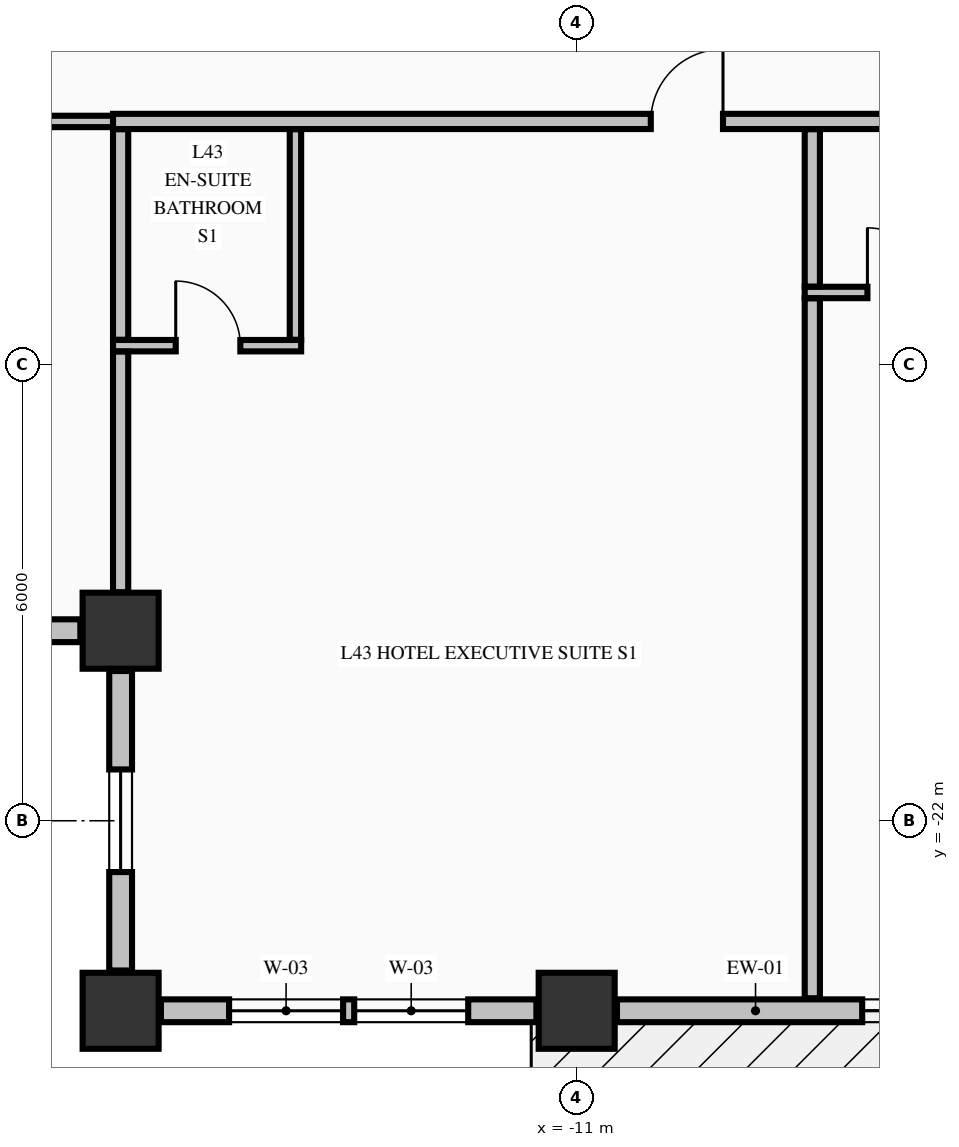
"""IFC4 building model, lengths in metres.
Left out: names, types, materials, properties, quantities, classifications, styles, units other than length and angle.
Written with IfcOpenShell. Run it as: python <this file> out.ifc"""

import sys

from ifc_helpers import new_model, si_unit, direction, frame, frame_2d, origin, origin_2d, place, context, subcontext, project, spatial, rectangle, extrude, element, fill, save


model = new_model("IFC4")
c1 = context("Model", 3, precision=1e-05, world=origin(), true_north=direction((0.0, 1.0)))
c2 = subcontext(c1, "Body", "Model", "MODEL_VIEW")
j1 = project(units=[si_unit("LENGTHUNIT", "METRE"), si_unit("PLANEANGLEUNIT", "RADIAN")], contexts=[c1])
p1 = place(None, origin())
s1 = spatial("IfcSite", under=j1, at=p1, CompositionType="ELEMENT")
p2 = place(p1, origin())
s2 = spatial("IfcBuilding", under=s1, at=p2, CompositionType="ELEMENT")
p3 = place(p2, frame((0.0, 0.0, 169.46)))
s3 = spatial("IfcBuildingStorey", under=s2, at=p3, CompositionType="ELEMENT", Elevation=169.46)
for number, where, z_axis, x_axis in (
    (1, (-17.0, -24.5, -0.25), (0.0, 0.0, 1.0), (1.0, 0.0, 0.0)),
    (2, (-11.0, -24.5, -0.25), (0.0, 0.0, 1.0), (1.0, 0.0, 0.0)),
    (3, (-17.0, -19.5, -0.25), (0.0, 0.0, 1.0), (1.0, 0.0, 0.0)),
):
    element("IfcColumn", number, at=place(p3, frame(where, z_axis=z_axis, x_axis=x_axis)), inside=s3, PredefinedType="COLUMN", context=c2, shape_type="SweptSolid", body=[
        extrude(rectangle(XDim=1.0, YDim=1.0, at=origin_2d()), origin(), (0.0, 0.0, 1.0), 3.4),
    ])
p4 = place(p3, frame((-21.47, -19.5, 0.0), z_axis=(0.0, 0.0, 1.0), x_axis=(1.0, 0.0, 0.0)))
e4 = element("IfcWall", 4, at=p4, inside=s3, PredefinedType="STANDARD", context=c2, shape_type="SweptSolid", body=[
    extrude(rectangle(XDim=3.94, YDim=0.3, at=frame_2d((1.97, 0.0))), origin(), (0.0, 0.0, 1.0), 2.542),
])
p5 = place(p4, frame((1.295, 0.0, 0.68)))
e5 = element("IfcOpeningElement", 5, at=p5, cuts=e4, PredefinedType="OPENING", context=c2, shape_type="SweptSolid", body=[
    extrude(rectangle(XDim=1.35, YDim=1.42, at=frame_2d((0.675, 0.71))), frame((0.0, 0.16, 0.0), z_axis=(0.0, -1.0, 0.0), x_axis=(1.0, 0.0, 0.0)), (0.0, 0.0, 1.0), 0.32),
])
p6 = place(p3, frame((-17.0, -20.03, 0.0), z_axis=(0.0, 0.0, 1.0), x_axis=(0.0, -1.0, 0.0)))
e6 = element("IfcWall", 6, at=p6, inside=s3, PredefinedType="STANDARD", context=c2, shape_type="SweptSolid", body=[
    extrude(rectangle(XDim=3.94, YDim=0.3, at=frame_2d((1.97, 0.0))), origin(), (0.0, 0.0, 1.0), 2.542),
])
p7 = place(p6, frame((1.295, 0.0, 0.68)))
e7 = element("IfcOpeningElement", 7, at=p7, cuts=e6, PredefinedType="OPENING", context=c2, shape_type="SweptSolid", body=[
    extrude(rectangle(XDim=1.35, YDim=1.42, at=frame_2d((0.675, 0.71))), frame((0.0, 0.16, 0.0), z_axis=(0.0, -1.0, 0.0), x_axis=(1.0, 0.0, 0.0)), (0.0, 0.0, 1.0), 0.32),
])
p8 = place(p3, frame((-16.47, -24.5, 0.0), z_axis=(0.0, 0.0, 1.0), x_axis=(1.0, 0.0, 0.0)))
e8 = element("IfcWall", 8, at=p8, inside=s3, PredefinedType="STANDARD", context=c2, shape_type="SweptSolid", body=[
    extrude(rectangle(XDim=4.94, YDim=0.3, at=frame_2d((2.47, 0.0))), origin(), (0.0, 0.0, 1.0), 2.542),
])
p9 = place(p8, frame((0.897, 0.0, 0.72)))
e9 = element("IfcOpeningElement", 9, at=p9, cuts=e8, PredefinedType="OPENING", context=c2, shape_type="SweptSolid", body=[
    extrude(rectangle(XDim=1.5, YDim=1.6, at=frame_2d((0.75, 0.8))), frame((0.0, 0.16, 0.0), z_axis=(0.0, -1.0, 0.0), x_axis=(1.0, 0.0, 0.0)), (0.0, 0.0, 1.0), 0.32),
])
p10 = place(p8, frame((2.543, 0.0, 0.72)))
e10 = element("IfcOpeningElement", 10, at=p10, cuts=e8, PredefinedType="OPENING", context=c2, shape_type="SweptSolid", body=[
    extrude(rectangle(XDim=1.5, YDim=1.6, at=frame_2d((0.75, 0.8))), frame((0.0, 0.16, 0.0), z_axis=(0.0, -1.0, 0.0), x_axis=(1.0, 0.0, 0.0)), (0.0, 0.0, 1.0), 0.32),
])
p11 = place(p3, frame((-10.47, -24.5, 0.0), z_axis=(0.0, 0.0, 1.0), x_axis=(1.0, 0.0, 0.0)))
e11 = element("IfcWall", 11, at=p11, inside=s3, PredefinedType="STANDARD", context=c2, shape_type="SweptSolid", body=[
    extrude(rectangle(XDim=9.94, YDim=0.3, at=frame_2d((4.97, 0.0))), origin(), (0.0, 0.0, 1.0), 2.542),
])
p12 = place(p11, frame((7.585, 0.0, 0.0)))
e12 = element("IfcOpeningElement", 12, at=p12, cuts=e11, PredefinedType="OPENING", context=c2, shape_type="SweptSolid", body=[
    extrude(rectangle(XDim=1.1, YDim=2.15, at=frame_2d((0.55, 1.075))), frame((0.0, 0.16, 0.0), z_axis=(0.0, -1.0, 0.0), x_axis=(1.0, 0.0, 0.0)), (0.0, 0.0, 1.0), 0.32),
])
p13 = place(p11, frame((3.226, 0.0, 0.72)))
e13 = element("IfcOpeningElement", 13, at=p13, cuts=e11, PredefinedType="OPENING", context=c2, shape_type="SweptSolid", body=[
    extrude(rectangle(XDim=1.5, YDim=1.6, at=frame_2d((0.75, 0.8))), frame((0.0, 0.16, 0.0), z_axis=(0.0, -1.0, 0.0), x_axis=(1.0, 0.0, 0.0)), (0.0, 0.0, 1.0), 0.32),
])
p14 = place(p11, frame((5.214, 0.0, 0.72)))
e14 = element("IfcOpeningElement", 14, at=p14, cuts=e11, PredefinedType="OPENING", context=c2, shape_type="SweptSolid", body=[
    extrude(rectangle(XDim=1.5, YDim=1.6, at=frame_2d((0.75, 0.8))), frame((0.0, 0.16, 0.0), z_axis=(0.0, -1.0, 0.0), x_axis=(1.0, 0.0, 0.0)), (0.0, 0.0, 1.0), 0.32),
])
p15 = place(p3, frame((-17.1, -15.75, 0.0), z_axis=(0.0, 0.0, 1.0), x_axis=(1.0, 0.0, 0.0)))
e15 = element("IfcWall", 15, at=p15, inside=s3, PredefinedType="PARTITIONING", context=c2, shape_type="SweptSolid", body=[
    extrude(rectangle(XDim=2.475, YDim=0.15, at=frame_2d((1.238, 0.0))), origin(), (0.0, 0.0, 1.0), 3.15),
])
p16 = place(p15, frame((0.825, 0.0, 0.0)))
e16 = element("IfcOpeningElement", 16, at=p16, cuts=e15, PredefinedType="OPENING", context=c2, shape_type="SweptSolid", body=[
    extrude(rectangle(XDim=0.85, YDim=2.1, at=frame_2d((0.425, 1.05))), frame((0.0, 0.085, 0.0), z_axis=(0.0, -1.0, 0.0), x_axis=(1.0, 0.0, 0.0)), (0.0, 0.0, 1.0), 0.17),
])
p17 = place(p3, frame((-8.0, -15.05, 0.0), z_axis=(0.0, 0.0, 1.0), x_axis=(1.0, 0.0, 0.0)))
e17 = element("IfcWall", 17, at=p17, inside=s3, PredefinedType="PARTITIONING", context=c2, shape_type="SweptSolid", body=[
    extrude(rectangle(XDim=2.475, YDim=0.15, at=frame_2d((1.238, 0.0))), origin(), (0.0, 0.0, 1.0), 3.15),
])
p18 = place(p17, frame((0.825, 0.0, 0.0)))
e18 = element("IfcOpeningElement", 18, at=p18, cuts=e17, PredefinedType="OPENING", context=c2, shape_type="SweptSolid", body=[
    extrude(rectangle(XDim=0.85, YDim=2.1, at=frame_2d((0.425, 1.05))), frame((0.0, 0.085, 0.0), z_axis=(0.0, -1.0, 0.0), x_axis=(1.0, 0.0, 0.0)), (0.0, 0.0, 1.0), 0.17),
])
p19 = place(p3, frame((-20.075, -12.8, 0.0), z_axis=(0.0, 0.0, 1.0), x_axis=(1.0, 0.0, 0.0)))
e19 = element("IfcWall", 19, at=p19, inside=s3, PredefinedType="PARTITIONING", context=c2, shape_type="SweptSolid", body=[
    extrude(rectangle(XDim=3.175, YDim=0.15, at=frame_2d((1.587, 0.0))), origin(), (0.0, 0.0, 1.0), 3.15),
])
p20 = place(p3, frame((-17.1, -12.8, 0.0), z_axis=(0.0, 0.0, 1.0), x_axis=(1.0, 0.0, 0.0)))
e20 = element("IfcWall", 20, at=p20, inside=s3, PredefinedType="PARTITIONING", context=c2, shape_type="SweptSolid", body=[
    extrude(rectangle(XDim=39.2, YDim=0.2, at=frame_2d((19.6, 0.0))), origin(), (0.0, 0.0, 1.0), 3.15),
])
p21 = place(p20, frame((7.075, 0.0, 0.0)))
e21 = element("IfcOpeningElement", 21, at=p21, cuts=e20, PredefinedType="OPENING", context=c2, shape_type="SweptSolid", body=[
    extrude(rectangle(XDim=0.95, YDim=2.15, at=frame_2d((0.475, 1.075))), frame((0.0, 0.11, 0.0), z_axis=(0.0, -1.0, 0.0), x_axis=(1.0, 0.0, 0.0)), (0.0, 0.0, 1.0), 0.22),
])
p22 = place(p20, frame((18.075, 0.0, 0.0)))
e22 = element("IfcOpeningElement", 22, at=p22, cuts=e20, PredefinedType="OPENING", context=c2, shape_type="SweptSolid", body=[
    extrude(rectangle(XDim=0.95, YDim=2.15, at=frame_2d((0.475, 1.075))), frame((0.0, 0.11, 0.0), z_axis=(0.0, -1.0, 0.0), x_axis=(1.0, 0.0, 0.0)), (0.0, 0.0, 1.0), 0.22),
])
p23 = place(p20, frame((25.605, 0.0, 0.0)))
e23 = element("IfcOpeningElement", 23, at=p23, cuts=e20, PredefinedType="OPENING", context=c2, shape_type="SweptSolid", body=[
    extrude(rectangle(XDim=0.95, YDim=2.15, at=frame_2d((0.475, 1.075))), frame((0.0, 0.11, 0.0), z_axis=(0.0, -1.0, 0.0), x_axis=(1.0, 0.0, 0.0)), (0.0, 0.0, 1.0), 0.22),
])
p24 = place(p20, frame((32.755, 0.0, 0.0)))
e24 = element("IfcOpeningElement", 24, at=p24, cuts=e20, PredefinedType="OPENING", context=c2, shape_type="SweptSolid", body=[
    extrude(rectangle(XDim=1.05, YDim=2.15, at=frame_2d((0.525, 1.075))), frame((0.0, 0.11, 0.0), z_axis=(0.0, -1.0, 0.0), x_axis=(1.0, 0.0, 0.0)), (0.0, 0.0, 1.0), 0.22),
])
p25 = place(p3, frame((-17.0, -18.994, 0.0), z_axis=(0.0, 0.0, 1.0), x_axis=(0.0, 1.0, 0.0)))
e25 = element("IfcWall", 25, at=p25, inside=s3, PredefinedType="PARTITIONING", context=c2, shape_type="SweptSolid", body=[
    extrude(rectangle(XDim=3.166, YDim=0.2, at=frame_2d((1.583, 0.0))), origin(), (0.0, 0.0, 1.0), 3.15),
])
p26 = place(p3, frame((-17.0, -15.672, 0.0), z_axis=(0.0, 0.0, 1.0), x_axis=(0.0, 1.0, 0.0)))
e26 = element("IfcWall", 26, at=p26, inside=s3, PredefinedType="PARTITIONING", context=c2, shape_type="SweptSolid", body=[
    extrude(rectangle(XDim=2.769, YDim=0.2, at=frame_2d((1.385, 0.0))), origin(), (0.0, 0.0, 1.0), 3.15),
])
p27 = place(p3, frame((-14.7, -15.672, 0.0), z_axis=(0.0, 0.0, 1.0), x_axis=(0.0, 1.0, 0.0)))
e27 = element("IfcWall", 27, at=p27, inside=s3, PredefinedType="PARTITIONING", context=c2, shape_type="SweptSolid", body=[
    extrude(rectangle(XDim=2.769, YDim=0.15, at=frame_2d((1.385, 0.0))), origin(), (0.0, 0.0, 1.0), 3.15),
])
p28 = place(p3, frame((-7.9, -24.335, 0.0), z_axis=(0.0, 0.0, 1.0), x_axis=(0.0, 1.0, 0.0)))
e28 = element("IfcWall", 28, at=p28, inside=s3, PredefinedType="PARTITIONING", context=c2, shape_type="SweptSolid", body=[
    extrude(rectangle(XDim=9.207, YDim=0.2, at=frame_2d((4.604, 0.0))), origin(), (0.0, 0.0, 1.0), 3.15),
])
p29 = place(p3, frame((-7.9, -14.972, 0.0), z_axis=(0.0, 0.0, 1.0), x_axis=(0.0, 1.0, 0.0)))
e29 = element("IfcWall", 29, at=p29, inside=s3, PredefinedType="PARTITIONING", context=c2, shape_type="SweptSolid", body=[
    extrude(rectangle(XDim=2.069, YDim=0.2, at=frame_2d((1.034, 0.0))), origin(), (0.0, 0.0, 1.0), 3.15),
])
p30 = place(p7, origin())
e30 = element("IfcWindow", 30, at=p30, inside=s3, PartitioningType="SINGLE_PANEL", PredefinedType="WINDOW", context=c2, shape_type="SweptSolid", body=[
    extrude(rectangle(XDim=1.35, YDim=1.42, at=frame_2d((0.675, 0.71))), frame((0.0, 0.03, 0.0), z_axis=(0.0, -1.0, 0.0), x_axis=(1.0, 0.0, 0.0)), (0.0, 0.0, 1.0), 0.06),
])
fill(e7, e30)
p31 = place(p9, origin())
e31 = element("IfcWindow", 31, at=p31, inside=s3, PartitioningType="SINGLE_PANEL", PredefinedType="WINDOW", context=c2, shape_type="SweptSolid", body=[
    extrude(rectangle(XDim=1.5, YDim=1.6, at=frame_2d((0.75, 0.8))), frame((0.0, 0.03, 0.0), z_axis=(0.0, -1.0, 0.0), x_axis=(1.0, 0.0, 0.0)), (0.0, 0.0, 1.0), 0.06),
])
fill(e9, e31)
p32 = place(p10, origin())
e32 = element("IfcWindow", 32, at=p32, inside=s3, PartitioningType="SINGLE_PANEL", PredefinedType="WINDOW", context=c2, shape_type="SweptSolid", body=[
    extrude(rectangle(XDim=1.5, YDim=1.6, at=frame_2d((0.75, 0.8))), frame((0.0, 0.03, 0.0), z_axis=(0.0, -1.0, 0.0), x_axis=(1.0, 0.0, 0.0)), (0.0, 0.0, 1.0), 0.06),
])
fill(e10, e32)
p33 = place(p13, origin())
e33 = element("IfcWindow", 33, at=p33, inside=s3, PartitioningType="SINGLE_PANEL", PredefinedType="WINDOW", context=c2, shape_type="SweptSolid", body=[
    extrude(rectangle(XDim=1.5, YDim=1.6, at=frame_2d((0.75, 0.8))), frame((0.0, 0.03, 0.0), z_axis=(0.0, -1.0, 0.0), x_axis=(1.0, 0.0, 0.0)), (0.0, 0.0, 1.0), 0.06),
])
fill(e13, e33)
p34 = place(p21, origin())
e34 = element("IfcDoor", 34, at=p34, inside=s3, OperationType="SINGLE_SWING_RIGHT", PredefinedType="DOOR", context=c2, shape_type="SweptSolid", body=[
    extrude(rectangle(XDim=0.95, YDim=2.15, at=frame_2d((0.475, 1.075))), frame((0.0, 0.025, 0.0), z_axis=(0.0, -1.0, 0.0), x_axis=(1.0, 0.0, 0.0)), (0.0, 0.0, 1.0), 0.05),
])
fill(e21, e34)
p35 = place(p16, origin())
e35 = element("IfcDoor", 35, at=p35, inside=s3, OperationType="SINGLE_SWING_LEFT", PredefinedType="DOOR", context=c2, shape_type="SweptSolid", body=[
    extrude(rectangle(XDim=0.85, YDim=2.1, at=frame_2d((0.425, 1.05))), frame((0.0, 0.025, 0.0), z_axis=(0.0, -1.0, 0.0), x_axis=(1.0, 0.0, 0.0)), (0.0, 0.0, 1.0), 0.05),
])
fill(e16, e35)
p36 = place(p18, origin())
e36 = element("IfcDoor", 36, at=p36, inside=s3, OperationType="SINGLE_SWING_LEFT", PredefinedType="DOOR", context=c2, shape_type="SweptSolid", body=[
    extrude(rectangle(XDim=0.85, YDim=2.1, at=frame_2d((0.425, 1.05))), frame((0.0, 0.025, 0.0), z_axis=(0.0, -1.0, 0.0), x_axis=(1.0, 0.0, 0.0)), (0.0, 0.0, 1.0), 0.05),
])
fill(e18, e36)
save(model, sys.argv[1])
